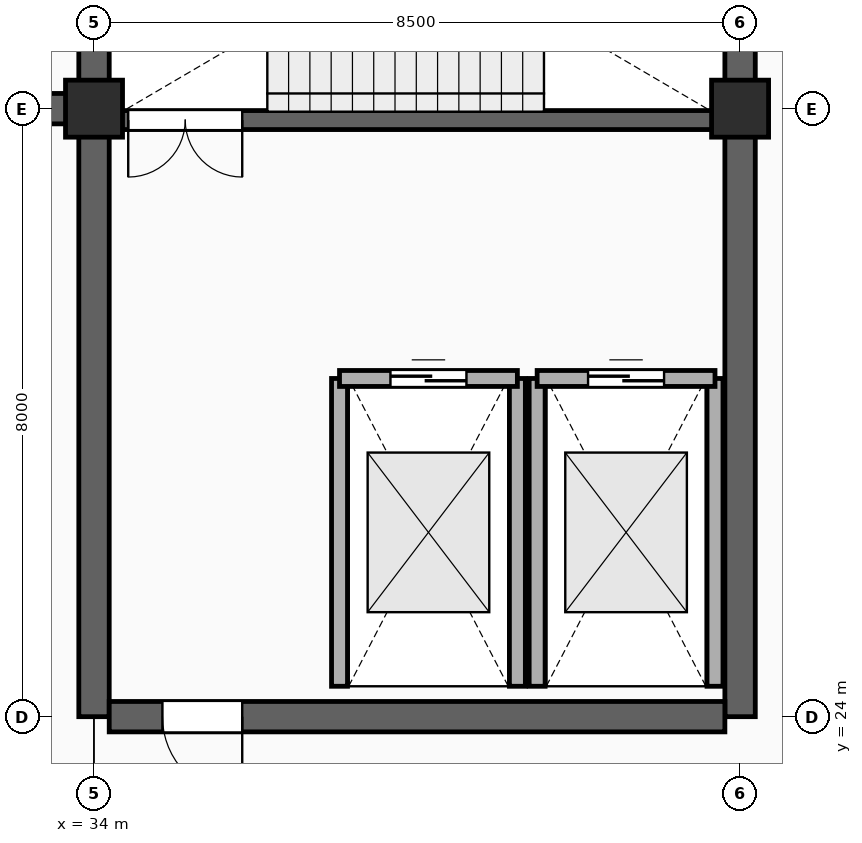
"""IFC4 building model, lengths in metres.
Left out: names, types, materials, properties, quantities, classifications, styles, units other than length and angle.
Written with IfcOpenShell. Run it as: python <this file> out.ifc"""

import sys

from ifc_helpers import new_model, si_unit, direction, frame, frame_2d, origin, origin_2d, place, context, subcontext, project, spatial, rectangle, extrude, element, fill, save


model = new_model("IFC4")
c1 = context("Model", 3, precision=1e-05, world=origin(), true_north=direction((0.0, 1.0)))
c2 = subcontext(c1, "Body", "Model", "MODEL_VIEW")
j1 = project(units=[si_unit("LENGTHUNIT", "METRE"), si_unit("PLANEANGLEUNIT", "RADIAN")], contexts=[c1])
p1 = place(None, origin())
s1 = spatial("IfcSite", under=j1, at=p1, CompositionType="ELEMENT")
p2 = place(p1, origin())
s2 = spatial("IfcBuilding", under=s1, at=p2, CompositionType="ELEMENT")
p3 = place(p2, frame((0.0, 0.0, 10.2)))
s3 = spatial("IfcBuildingStorey", under=s2, at=p3, CompositionType="ELEMENT", Elevation=10.2)
p4 = place(p3, frame((34.0, 32.0, 0.0), z_axis=(0.0, 0.0, 1.0), x_axis=(0.0, 1.0, 0.0)))
e1 = element("IfcWall", 1, at=p4, inside=s3, PredefinedType="SHEAR", context=c2, shape_type="SweptSolid", body=[
    extrude(rectangle(XDim=12.8, YDim=0.4, at=frame_2d((6.4, 0.0))), origin(), (0.0, 0.0, 1.0), 4.64),
])
p5 = place(p3, frame((25.7, 32.0, 0.0), z_axis=(0.0, 0.0, 1.0), x_axis=(1.0, 0.0, 0.0)))
e2 = element("IfcWall", 2, at=p5, inside=s3, PredefinedType="SHEAR", context=c2, shape_type="SweptSolid", body=[
    extrude(rectangle(XDim=8.1, YDim=0.4, at=frame_2d((4.05, 0.0))), origin(), (0.0, 0.0, 1.0), 4.64),
])
p6 = place(p3, frame((34.0, 24.0, 0.0), z_axis=(0.0, 0.0, 1.0), x_axis=(0.0, 1.0, 0.0)))
e3 = element("IfcWall", 3, at=p6, inside=s3, PredefinedType="SHEAR", context=c2, shape_type="SweptSolid", body=[
    extrude(rectangle(XDim=7.8, YDim=0.4, at=frame_2d((3.9, 0.0))), origin(), (0.0, 0.0, 1.0), 4.64),
])
p7 = place(p3, frame((42.5, 24.0, 0.0), z_axis=(0.0, 0.0, 1.0), x_axis=(0.0, 1.0, 0.0)))
e4 = element("IfcWall", 4, at=p7, inside=s3, PredefinedType="SHEAR", context=c2, shape_type="SweptSolid", body=[
    extrude(rectangle(XDim=12.8, YDim=0.4, at=frame_2d((6.4, 0.0))), origin(), (0.0, 0.0, 1.0), 4.64),
])
p8 = place(p3, frame((34.2, 24.0, 0.0), z_axis=(0.0, 0.0, 1.0), x_axis=(1.0, 0.0, 0.0)))
e5 = element("IfcWall", 5, at=p8, inside=s3, PredefinedType="SHEAR", context=c2, shape_type="SweptSolid", body=[
    extrude(rectangle(XDim=8.1, YDim=0.4, at=frame_2d((4.05, 0.0))), origin(), (0.0, 0.0, 1.0), 4.64),
])
p9 = place(p8, frame((0.7, 0.0, 0.0)))
e6 = element("IfcOpeningElement", 6, at=p9, cuts=e5, PredefinedType="OPENING", context=c2, shape_type="SweptSolid", body=[
    extrude(rectangle(XDim=1.05, YDim=2.15, at=frame_2d((0.525, 1.075))), frame((0.0, 0.212, 0.0), z_axis=(0.0, -1.0, 0.0), x_axis=(1.0, 0.0, 0.0)), (0.0, 0.0, 1.0), 0.424),
])
p10 = place(p3, frame((34.25, 31.85, 0.0), z_axis=(0.0, 0.0, 1.0), x_axis=(1.0, 0.0, 0.0)))
e7 = element("IfcWall", 7, at=p10, inside=s3, PredefinedType="STANDARD", context=c2, shape_type="SweptSolid", body=[
    extrude(rectangle(XDim=8.0, YDim=0.25, at=frame_2d((4.0, 0.0))), origin(), (0.0, 0.0, 1.0), 4.64),
])
p11 = place(p10, frame((0.2, 0.0, 0.0)))
e8 = element("IfcOpeningElement", 8, at=p11, cuts=e7, PredefinedType="OPENING", context=c2, shape_type="SweptSolid", body=[
    extrude(rectangle(XDim=1.5, YDim=2.2, at=frame_2d((0.75, 1.1))), frame((0.0, 0.137, 0.0), z_axis=(0.0, -1.0, 0.0), x_axis=(1.0, 0.0, 0.0)), (0.0, 0.0, 1.0), 0.274),
])
for number, where, z_axis, x_axis in (
    (9, (37.23, 24.4, 0.0), (0.0, 0.0, 1.0), (0.0, 1.0, 0.0)),
    (10, (39.57, 24.4, 0.0), (0.0, 0.0, 1.0), (0.0, 1.0, 0.0)),
):
    element("IfcWall", number, at=place(p3, frame(where, z_axis=z_axis, x_axis=x_axis)), inside=s3, PredefinedType="PARTITIONING", context=c2, shape_type="SweptSolid", body=[
        extrude(rectangle(XDim=4.05, YDim=0.21, at=frame_2d((2.025, 0.0))), origin(), (0.0, 0.0, 1.0), 4.64),
    ])
p12 = place(p3, frame((37.23, 28.45, 0.0), z_axis=(0.0, 0.0, 1.0), x_axis=(1.0, 0.0, 0.0)))
e11 = element("IfcWall", 11, at=p12, inside=s3, PredefinedType="PARTITIONING", context=c2, shape_type="SweptSolid", body=[
    extrude(rectangle(XDim=2.34, YDim=0.21, at=frame_2d((1.17, 0.0))), origin(), (0.0, 0.0, 1.0), 4.64),
])
p13 = place(p12, frame((0.67, 0.0, 0.0)))
e12 = element("IfcOpeningElement", 12, at=p13, cuts=e11, PredefinedType="OPENING", context=c2, shape_type="SweptSolid", body=[
    extrude(rectangle(XDim=1.0, YDim=2.2, at=frame_2d((0.5, 1.1))), frame((0.0, 0.117, 0.0), z_axis=(0.0, -1.0, 0.0), x_axis=(1.0, 0.0, 0.0)), (0.0, 0.0, 1.0), 0.234),
])
for number, where, z_axis, x_axis in (
    (13, (39.83, 24.4, 0.0), (0.0, 0.0, 1.0), (0.0, 1.0, 0.0)),
    (14, (42.17, 24.4, 0.0), (0.0, 0.0, 1.0), (0.0, 1.0, 0.0)),
):
    element("IfcWall", number, at=place(p3, frame(where, z_axis=z_axis, x_axis=x_axis)), inside=s3, PredefinedType="PARTITIONING", context=c2, shape_type="SweptSolid", body=[
        extrude(rectangle(XDim=4.05, YDim=0.21, at=frame_2d((2.025, 0.0))), origin(), (0.0, 0.0, 1.0), 4.64),
    ])
p14 = place(p3, frame((39.83, 28.45, 0.0), z_axis=(0.0, 0.0, 1.0), x_axis=(1.0, 0.0, 0.0)))
e15 = element("IfcWall", 15, at=p14, inside=s3, PredefinedType="PARTITIONING", context=c2, shape_type="SweptSolid", body=[
    extrude(rectangle(XDim=2.34, YDim=0.21, at=frame_2d((1.17, 0.0))), origin(), (0.0, 0.0, 1.0), 4.64),
])
p15 = place(p14, frame((0.67, 0.0, 0.0)))
e16 = element("IfcOpeningElement", 16, at=p15, cuts=e15, PredefinedType="OPENING", context=c2, shape_type="SweptSolid", body=[
    extrude(rectangle(XDim=1.0, YDim=2.2, at=frame_2d((0.5, 1.1))), frame((0.0, 0.117, 0.0), z_axis=(0.0, -1.0, 0.0), x_axis=(1.0, 0.0, 0.0)), (0.0, 0.0, 1.0), 0.234),
])
for number, where, z_axis, x_axis in (
    (17, (34.0, 32.0, 0.0), (0.0, 0.0, 1.0), (1.0, 0.0, 0.0)),
    (18, (42.5, 32.0, 0.0), (0.0, 0.0, 1.0), (1.0, 0.0, 0.0)),
):
    element("IfcColumn", number, at=place(p3, frame(where, z_axis=z_axis, x_axis=x_axis)), inside=s3, PredefinedType="COLUMN", context=c2, shape_type="SweptSolid", body=[
        extrude(rectangle(XDim=0.75, YDim=0.75, at=origin_2d()), origin(), (0.0, 0.0, 1.0), 4.52),
    ])
p16 = place(p11, frame((1.5, 0.0, 0.0), z_axis=(0.0, 0.0, 1.0), x_axis=(-1.0, 0.0, 0.0)))
e19 = element("IfcDoor", 19, at=p16, inside=s3, OperationType="DOUBLE_DOOR_SINGLE_SWING", PredefinedType="DOOR", context=c2, shape_type="SweptSolid", body=[
    extrude(rectangle(XDim=1.5, YDim=2.2, at=frame_2d((0.75, 1.1))), frame((0.0, 0.025, 0.0), z_axis=(0.0, -1.0, 0.0), x_axis=(1.0, 0.0, 0.0)), (0.0, 0.0, 1.0), 0.05),
])
fill(e8, e19)
p17 = place(p13, origin())
e20 = element("IfcDoor", 20, at=p17, inside=s3, OperationType="DOUBLE_DOOR_SLIDING", PredefinedType="DOOR", context=c2, shape_type="SweptSolid", body=[
    extrude(rectangle(XDim=1.0, YDim=2.2, at=frame_2d((0.5, 1.1))), frame((0.0, 0.025, 0.0), z_axis=(0.0, -1.0, 0.0), x_axis=(1.0, 0.0, 0.0)), (0.0, 0.0, 1.0), 0.05),
])
fill(e12, e20)
p18 = place(p15, origin())
e21 = element("IfcDoor", 21, at=p18, inside=s3, OperationType="DOUBLE_DOOR_SLIDING", PredefinedType="DOOR", context=c2, shape_type="SweptSolid", body=[
    extrude(rectangle(XDim=1.0, YDim=2.2, at=frame_2d((0.5, 1.1))), frame((0.0, 0.025, 0.0), z_axis=(0.0, -1.0, 0.0), x_axis=(1.0, 0.0, 0.0)), (0.0, 0.0, 1.0), 0.05),
])
fill(e16, e21)
p19 = place(p9, frame((1.05, 0.0, 0.0), z_axis=(0.0, 0.0, 1.0), x_axis=(-1.0, 0.0, 0.0)))
e22 = element("IfcDoor", 22, at=p19, inside=s3, OperationType="SINGLE_SWING_RIGHT", PredefinedType="DOOR", context=c2, shape_type="SweptSolid", body=[
    extrude(rectangle(XDim=1.05, YDim=2.15, at=frame_2d((0.525, 1.075))), frame((0.0, 0.025, 0.0), z_axis=(0.0, -1.0, 0.0), x_axis=(1.0, 0.0, 0.0)), (0.0, 0.0, 1.0), 0.05),
])
fill(e6, e22)
save(model, sys.argv[1])
